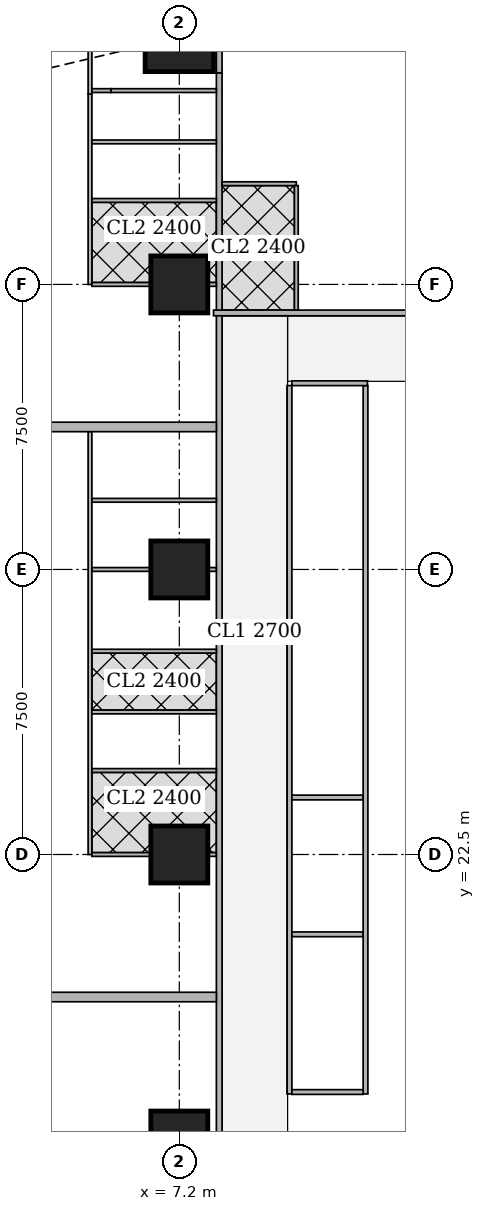
"""IFC4 building model, lengths in metres.
Left out: names, types, materials, properties, quantities, classifications, styles, units other than length and angle.
Written with IfcOpenShell. Run it as: python <this file> out.ifc"""

import sys

from ifc_helpers import new_model, si_unit, direction, frame, frame_2d, origin, origin_2d, place, context, subcontext, project, spatial, rectangle, extrude, element, fill, save


model = new_model("IFC4")
c1 = context("Model", 3, precision=1e-05, world=origin(), true_north=direction((0.0, 1.0)))
c2 = subcontext(c1, "Body", "Model", "MODEL_VIEW")
j1 = project(units=[si_unit("LENGTHUNIT", "METRE"), si_unit("PLANEANGLEUNIT", "RADIAN")], contexts=[c1])
p1 = place(None, origin())
s1 = spatial("IfcSite", under=j1, at=p1, CompositionType="ELEMENT")
p2 = place(p1, origin())
s2 = spatial("IfcBuilding", under=s1, at=p2, CompositionType="ELEMENT")
p3 = place(p2, frame((0.0, 0.0, 147.05)))
s3 = spatial("IfcBuildingStorey", under=s2, at=p3, CompositionType="ELEMENT", Elevation=147.05)
for number, where, z_axis, x_axis in (
    (1, (7.2, 15.0, 0.0), (0.0, 0.0, 1.0), (1.0, 0.0, 0.0)),
    (2, (7.2, 22.5, 0.0), (0.0, 0.0, 1.0), (1.0, 0.0, 0.0)),
    (3, (7.2, 30.0, 0.0), (0.0, 0.0, 1.0), (1.0, 0.0, 0.0)),
    (4, (7.2, 37.5, 0.0), (0.0, 0.0, 1.0), (1.0, 0.0, 0.0)),
):
    element("IfcColumn", number, at=place(p3, frame(where, z_axis=z_axis, x_axis=x_axis)), inside=s3, PredefinedType="COLUMN", context=c2, shape_type="SweptSolid", body=[
        extrude(rectangle(XDim=1.5, YDim=1.5, at=origin_2d()), origin(), (0.0, 0.0, 1.0), 3.75),
    ])
p4 = place(p3, frame((7.2, 44.0, 0.0), z_axis=(0.0, 0.0, 1.0), x_axis=(1.0, 0.0, 0.0)))
e5 = element("IfcColumn", 5, at=p4, inside=s3, PredefinedType="COLUMN", context=c2, shape_type="SweptSolid", body=[
    extrude(rectangle(XDim=1.8, YDim=1.8, at=origin_2d()), origin(), (0.0, 0.0, 1.0), 3.75),
])
p5 = place(p3, frame((8.25, 1.957, 0.0), z_axis=(0.0, 0.0, 1.0), x_axis=(0.0, 1.0, 0.0)))
e6 = element("IfcWall", 6, at=p5, inside=s3, PredefinedType="SOLIDWALL", context=c2, shape_type="SweptSolid", body=[
    extrude(rectangle(XDim=41.111, YDim=0.15, at=frame_2d((20.556, 0.0))), origin(), (0.0, 0.0, 1.0), 3.5),
])
p6 = place(p5, frame((14.418, 0.0, 0.0)))
e7 = element("IfcOpeningElement", 7, at=p6, cuts=e6, PredefinedType="OPENING", context=c2, shape_type="SweptSolid", body=[
    extrude(rectangle(XDim=1.0, YDim=2.1, at=frame_2d((0.5, 1.05))), frame((0.0, 0.085, 0.0), z_axis=(0.0, -1.0, 0.0), x_axis=(1.0, 0.0, 0.0)), (0.0, 0.0, 1.0), 0.17),
])
p7 = place(p5, frame((18.168, 0.0, 0.0)))
e8 = element("IfcOpeningElement", 8, at=p7, cuts=e6, PredefinedType="OPENING", context=c2, shape_type="SweptSolid", body=[
    extrude(rectangle(XDim=1.0, YDim=2.1, at=frame_2d((0.5, 1.05))), frame((0.0, 0.085, 0.0), z_axis=(0.0, -1.0, 0.0), x_axis=(1.0, 0.0, 0.0)), (0.0, 0.0, 1.0), 0.17),
])
p8 = place(p5, frame((33.168, 0.0, 0.0)))
e9 = element("IfcOpeningElement", 9, at=p8, cuts=e6, PredefinedType="OPENING", context=c2, shape_type="SweptSolid", body=[
    extrude(rectangle(XDim=1.0, YDim=2.1, at=frame_2d((0.5, 1.05))), frame((0.0, 0.085, 0.0), z_axis=(0.0, -1.0, 0.0), x_axis=(1.0, 0.0, 0.0)), (0.0, 0.0, 1.0), 0.17),
])
p9 = place(p3, frame((8.25, 43.068, 0.0), z_axis=(0.0, 0.0, 1.0), x_axis=(0.0, 1.0, 0.0)))
e10 = element("IfcWall", 10, at=p9, inside=s3, PredefinedType="SOLIDWALL", context=c2, shape_type="SweptSolid", body=[
    extrude(rectangle(XDim=1.805, YDim=0.15, at=frame_2d((0.902, 0.0))), origin(), (0.0, 0.0, 1.0), 2.1),
])
p10 = place(p3, frame((8.1, 36.75, 0.0), z_axis=(0.0, 0.0, 1.0), x_axis=(1.0, 0.0, 0.0)))
e11 = element("IfcWall", 11, at=p10, inside=s3, PredefinedType="SOLIDWALL", context=c2, shape_type="SweptSolid", body=[
    extrude(rectangle(XDim=5.549, YDim=0.15, at=frame_2d((2.774, 0.0))), origin(), (0.0, 0.0, 1.0), 3.5),
])
p11 = place(p10, frame((3.739, 0.0, 0.0)))
e12 = element("IfcOpeningElement", 12, at=p11, cuts=e11, PredefinedType="OPENING", context=c2, shape_type="SweptSolid", body=[
    extrude(rectangle(XDim=1.0, YDim=2.1, at=frame_2d((0.5, 1.05))), frame((0.0, 0.085, 0.0), z_axis=(0.0, -1.0, 0.0), x_axis=(1.0, 0.0, 0.0)), (0.0, 0.0, 1.0), 0.17),
])
p12 = place(p3, frame((4.85, 22.5, 0.0), z_axis=(0.0, 0.0, 1.0), x_axis=(0.0, 1.0, 0.0)))
e13 = element("IfcWall", 13, at=p12, inside=s3, PredefinedType="PARTITIONING", context=c2, shape_type="SweptSolid", body=[
    extrude(rectangle(XDim=11.125, YDim=0.1, at=frame_2d((5.562, 0.0))), origin(), (0.0, 0.0, 1.0), 3.5),
])
p13 = place(p12, frame((0.655, 0.0, 0.0)))
e14 = element("IfcOpeningElement", 14, at=p13, cuts=e13, PredefinedType="OPENING", context=c2, shape_type="SweptSolid", body=[
    extrude(rectangle(XDim=0.9, YDim=2.1, at=frame_2d((0.45, 1.05))), frame((0.0, 0.06, 0.0), z_axis=(0.0, -1.0, 0.0), x_axis=(1.0, 0.0, 0.0)), (0.0, 0.0, 1.0), 0.12),
])
p14 = place(p12, frame((4.1, 0.0, 0.0)))
e15 = element("IfcOpeningElement", 15, at=p14, cuts=e13, PredefinedType="OPENING", context=c2, shape_type="SweptSolid", body=[
    extrude(rectangle(XDim=0.9, YDim=2.1, at=frame_2d((0.45, 1.05))), frame((0.0, 0.06, 0.0), z_axis=(0.0, -1.0, 0.0), x_axis=(1.0, 0.0, 0.0)), (0.0, 0.0, 1.0), 0.12),
])
p15 = place(p12, frame((7.96, 0.0, 0.0)))
e16 = element("IfcOpeningElement", 16, at=p15, cuts=e13, PredefinedType="OPENING", context=c2, shape_type="SweptSolid", body=[
    extrude(rectangle(XDim=0.9, YDim=2.1, at=frame_2d((0.45, 1.05))), frame((0.0, 0.06, 0.0), z_axis=(0.0, -1.0, 0.0), x_axis=(1.0, 0.0, 0.0)), (0.0, 0.0, 1.0), 0.12),
])
p16 = place(p12, frame((2.53, 0.0, 0.0)))
e17 = element("IfcOpeningElement", 17, at=p16, cuts=e13, PredefinedType="OPENING", context=c2, shape_type="SweptSolid", body=[
    extrude(rectangle(XDim=0.9, YDim=2.1, at=frame_2d((0.45, 1.05))), frame((0.0, 0.06, 0.0), z_axis=(0.0, -1.0, 0.0), x_axis=(1.0, 0.0, 0.0)), (0.0, 0.0, 1.0), 0.12),
])
p17 = place(p12, frame((5.975, 0.0, 0.0)))
e18 = element("IfcOpeningElement", 18, at=p17, cuts=e13, PredefinedType="OPENING", context=c2, shape_type="SweptSolid", body=[
    extrude(rectangle(XDim=0.9, YDim=2.1, at=frame_2d((0.45, 1.05))), frame((0.0, 0.06, 0.0), z_axis=(0.0, -1.0, 0.0), x_axis=(1.0, 0.0, 0.0)), (0.0, 0.0, 1.0), 0.12),
])
p18 = place(p12, frame((9.835, 0.0, 0.0)))
e19 = element("IfcOpeningElement", 19, at=p18, cuts=e13, PredefinedType="OPENING", context=c2, shape_type="SweptSolid", body=[
    extrude(rectangle(XDim=0.9, YDim=2.1, at=frame_2d((0.45, 1.05))), frame((0.0, 0.06, 0.0), z_axis=(0.0, -1.0, 0.0), x_axis=(1.0, 0.0, 0.0)), (0.0, 0.0, 1.0), 0.12),
])
p19 = place(p3, frame((4.9, 22.5, 0.0), z_axis=(0.0, 0.0, 1.0), x_axis=(1.0, 0.0, 0.0)))
e20 = element("IfcWall", 20, at=p19, inside=s3, PredefinedType="PARTITIONING", context=c2, shape_type="SweptSolid", body=[
    extrude(rectangle(XDim=1.549, YDim=0.1, at=frame_2d((0.774, 0.0))), origin(), (0.0, 0.0, 1.0), 3.5),
])
p20 = place(p3, frame((7.951, 22.5, 0.0), z_axis=(0.0, 0.0, 1.0), x_axis=(1.0, 0.0, 0.0)))
e21 = element("IfcWall", 21, at=p20, inside=s3, PredefinedType="PARTITIONING", context=c2, shape_type="SweptSolid", body=[
    extrude(rectangle(XDim=0.224, YDim=0.1, at=frame_2d((0.112, 0.0))), origin(), (0.0, 0.0, 1.0), 3.5),
])
p21 = place(p3, frame((4.9, 26.25, 0.0), z_axis=(0.0, 0.0, 1.0), x_axis=(1.0, 0.0, 0.0)))
e22 = element("IfcWall", 22, at=p21, inside=s3, PredefinedType="PARTITIONING", context=c2, shape_type="SweptSolid", body=[
    extrude(rectangle(XDim=3.275, YDim=0.1, at=frame_2d((1.638, 0.0))), origin(), (0.0, 0.0, 1.0), 3.5),
])
p22 = place(p3, frame((4.9, 30.0, 0.0), z_axis=(0.0, 0.0, 1.0), x_axis=(1.0, 0.0, 0.0)))
e23 = element("IfcWall", 23, at=p22, inside=s3, PredefinedType="PARTITIONING", context=c2, shape_type="SweptSolid", body=[
    extrude(rectangle(XDim=1.549, YDim=0.1, at=frame_2d((0.774, 0.0))), origin(), (0.0, 0.0, 1.0), 3.5),
])
p23 = place(p3, frame((7.951, 30.0, 0.0), z_axis=(0.0, 0.0, 1.0), x_axis=(1.0, 0.0, 0.0)))
e24 = element("IfcWall", 24, at=p23, inside=s3, PredefinedType="PARTITIONING", context=c2, shape_type="SweptSolid", body=[
    extrude(rectangle(XDim=0.224, YDim=0.1, at=frame_2d((0.112, 0.0))), origin(), (0.0, 0.0, 1.0), 3.5),
])
for number, where, z_axis, x_axis in (
    (25, (4.9, 24.71, 0.0), (0.0, 0.0, 1.0), (1.0, 0.0, 0.0)),
    (26, (4.9, 27.85, 0.0), (0.0, 0.0, 1.0), (1.0, 0.0, 0.0)),
    (27, (4.9, 31.82, 0.0), (0.0, 0.0, 1.0), (1.0, 0.0, 0.0)),
):
    element("IfcWall", number, at=place(p3, frame(where, z_axis=z_axis, x_axis=x_axis)), inside=s3, PredefinedType="PARTITIONING", context=c2, shape_type="SweptSolid", body=[
        extrude(rectangle(XDim=3.275, YDim=0.1, at=frame_2d((1.638, 0.0))), origin(), (0.0, 0.0, 1.0), 3.5),
    ])
p24 = place(p3, frame((3.65, 18.75, 0.0), z_axis=(0.0, 0.0, 1.0), x_axis=(1.0, 0.0, 0.0)))
e28 = element("IfcWall", 28, at=p24, inside=s3, PredefinedType="SOLIDWALL", context=c2, shape_type="SweptSolid", body=[
    extrude(rectangle(XDim=4.525, YDim=0.25, at=frame_2d((2.263, 0.0))), origin(), (0.0, 0.0, 1.0), 3.5),
])
p25 = place(p3, frame((4.85, 37.5, 0.0), z_axis=(0.0, 0.0, 1.0), x_axis=(0.0, 1.0, 0.0)))
e29 = element("IfcWall", 29, at=p25, inside=s3, PredefinedType="PARTITIONING", context=c2, shape_type="SweptSolid", body=[
    extrude(rectangle(XDim=5.007, YDim=0.1, at=frame_2d((2.503, 0.0))), origin(), (0.0, 0.0, 1.0), 3.5),
])
p26 = place(p25, frame((0.655, 0.0, 0.0)))
e30 = element("IfcOpeningElement", 30, at=p26, cuts=e29, PredefinedType="OPENING", context=c2, shape_type="SweptSolid", body=[
    extrude(rectangle(XDim=0.9, YDim=2.1, at=frame_2d((0.45, 1.05))), frame((0.0, 0.06, 0.0), z_axis=(0.0, -1.0, 0.0), x_axis=(1.0, 0.0, 0.0)), (0.0, 0.0, 1.0), 0.12),
])
p27 = place(p25, frame((2.53, 0.0, 0.0)))
e31 = element("IfcOpeningElement", 31, at=p27, cuts=e29, PredefinedType="OPENING", context=c2, shape_type="SweptSolid", body=[
    extrude(rectangle(XDim=0.9, YDim=2.1, at=frame_2d((0.45, 1.05))), frame((0.0, 0.06, 0.0), z_axis=(0.0, -1.0, 0.0), x_axis=(1.0, 0.0, 0.0)), (0.0, 0.0, 1.0), 0.12),
])
p28 = place(p3, frame((4.85, 42.507, 0.0), z_axis=(0.0, 0.0, 1.0), x_axis=(0.0, 1.0, 0.0)))
e32 = element("IfcWall", 32, at=p28, inside=s3, PredefinedType="PARTITIONING", context=c2, shape_type="SweptSolid", body=[
    extrude(rectangle(XDim=1.874, YDim=0.1, at=frame_2d((0.937, 0.0))), origin(), (0.0, 0.0, 1.0), 2.1),
])
p29 = place(p3, frame((4.9, 37.5, 0.0), z_axis=(0.0, 0.0, 1.0), x_axis=(1.0, 0.0, 0.0)))
e33 = element("IfcWall", 33, at=p29, inside=s3, PredefinedType="PARTITIONING", context=c2, shape_type="SweptSolid", body=[
    extrude(rectangle(XDim=1.549, YDim=0.1, at=frame_2d((0.774, 0.0))), origin(), (0.0, 0.0, 1.0), 3.5),
])
p30 = place(p3, frame((7.951, 37.5, 0.0), z_axis=(0.0, 0.0, 1.0), x_axis=(1.0, 0.0, 0.0)))
e34 = element("IfcWall", 34, at=p30, inside=s3, PredefinedType="PARTITIONING", context=c2, shape_type="SweptSolid", body=[
    extrude(rectangle(XDim=0.224, YDim=0.1, at=frame_2d((0.112, 0.0))), origin(), (0.0, 0.0, 1.0), 3.5),
])
for number, where, z_axis, x_axis in (
    (35, (4.9, 41.25, 0.0), (0.0, 0.0, 1.0), (1.0, 0.0, 0.0)),
    (36, (4.9, 39.71, 0.0), (0.0, 0.0, 1.0), (1.0, 0.0, 0.0)),
):
    element("IfcWall", number, at=place(p3, frame(where, z_axis=z_axis, x_axis=x_axis)), inside=s3, PredefinedType="PARTITIONING", context=c2, shape_type="SweptSolid", body=[
        extrude(rectangle(XDim=3.275, YDim=0.1, at=frame_2d((1.638, 0.0))), origin(), (0.0, 0.0, 1.0), 3.5),
    ])
p31 = place(p3, frame((3.65, 33.75, 0.0), z_axis=(0.0, 0.0, 1.0), x_axis=(1.0, 0.0, 0.0)))
e37 = element("IfcWall", 37, at=p31, inside=s3, PredefinedType="SOLIDWALL", context=c2, shape_type="SweptSolid", body=[
    extrude(rectangle(XDim=4.525, YDim=0.25, at=frame_2d((2.263, 0.0))), origin(), (0.0, 0.0, 1.0), 3.5),
])
p32 = place(p3, frame((8.325, 40.15, 0.0), z_axis=(0.0, 0.0, 1.0), x_axis=(1.0, 0.0, 0.0)))
e38 = element("IfcWall", 38, at=p32, inside=s3, PredefinedType="PARTITIONING", context=c2, shape_type="SweptSolid", body=[
    extrude(rectangle(XDim=1.954, YDim=0.1, at=frame_2d((0.977, 0.0))), origin(), (0.0, 0.0, 1.0), 3.5),
])
p33 = place(p32, frame((0.475, 0.0, 0.0)))
e39 = element("IfcOpeningElement", 39, at=p33, cuts=e38, PredefinedType="OPENING", context=c2, shape_type="SweptSolid", body=[
    extrude(rectangle(XDim=0.9, YDim=2.1, at=frame_2d((0.45, 1.05))), frame((0.0, 0.06, 0.0), z_axis=(0.0, -1.0, 0.0), x_axis=(1.0, 0.0, 0.0)), (0.0, 0.0, 1.0), 0.12),
])
p34 = place(p3, frame((10.279, 36.825, 0.0), z_axis=(0.0, 0.0, 1.0), x_axis=(0.0, 1.0, 0.0)))
e40 = element("IfcWall", 40, at=p34, inside=s3, PredefinedType="PARTITIONING", context=c2, shape_type="SweptSolid", body=[
    extrude(rectangle(XDim=3.275, YDim=0.1, at=frame_2d((1.638, 0.0))), origin(), (0.0, 0.0, 1.0), 3.5),
])
p35 = place(p3, frame((4.9, 42.6, 0.0), z_axis=(0.0, 0.0, 1.0), x_axis=(1.0, 0.0, 0.0)))
e41 = element("IfcWall", 41, at=p35, inside=s3, PredefinedType="PARTITIONING", context=c2, shape_type="SweptSolid", body=[
    extrude(rectangle(XDim=0.503, YDim=0.1, at=frame_2d((0.251, 0.0))), origin(), (0.0, 0.0, 1.0), 2.1),
])
p36 = place(p3, frame((5.403, 42.6, 0.0), z_axis=(0.0, 0.0, 1.0), x_axis=(1.0, 0.0, 0.0)))
e42 = element("IfcWall", 42, at=p36, inside=s3, PredefinedType="PARTITIONING", context=c2, shape_type="SweptSolid", body=[
    extrude(rectangle(XDim=2.772, YDim=0.1, at=frame_2d((1.386, 0.0))), origin(), (0.0, 0.0, 1.0), 3.5),
])
p37 = place(p36, frame((0.15, 0.0, 0.0)))
e43 = element("IfcOpeningElement", 43, at=p37, cuts=e42, PredefinedType="OPENING", context=c2, shape_type="SweptSolid", body=[
    extrude(rectangle(XDim=0.9, YDim=2.1, at=frame_2d((0.45, 1.05))), frame((0.0, 0.06, 0.0), z_axis=(0.0, -1.0, 0.0), x_axis=(1.0, 0.0, 0.0)), (0.0, 0.0, 1.0), 0.12),
])
p38 = place(p3, frame((10.1, 16.2, 0.0), z_axis=(0.0, 0.0, 1.0), x_axis=(0.0, 1.0, 0.0)))
e44 = element("IfcWall", 44, at=p38, inside=s3, PredefinedType="PARTITIONING", context=c2, shape_type="SweptSolid", body=[
    extrude(rectangle(XDim=18.638, YDim=0.125, at=frame_2d((9.319, 0.0))), origin(), (0.0, 0.0, 1.0), 3.5),
])
p39 = place(p38, frame((1.6, 0.0, 0.0)))
e45 = element("IfcOpeningElement", 45, at=p39, cuts=e44, PredefinedType="OPENING", context=c2, shape_type="SweptSolid", body=[
    extrude(rectangle(XDim=1.0, YDim=2.1, at=frame_2d((0.5, 1.05))), frame((0.0, 0.073, 0.0), z_axis=(0.0, -1.0, 0.0), x_axis=(1.0, 0.0, 0.0)), (0.0, 0.0, 1.0), 0.145),
])
p40 = place(p38, frame((5.5, 0.0, 0.0)))
e46 = element("IfcOpeningElement", 46, at=p40, cuts=e44, PredefinedType="OPENING", context=c2, shape_type="SweptSolid", body=[
    extrude(rectangle(XDim=1.0, YDim=2.1, at=frame_2d((0.5, 1.05))), frame((0.0, 0.073, 0.0), z_axis=(0.0, -1.0, 0.0), x_axis=(1.0, 0.0, 0.0)), (0.0, 0.0, 1.0), 0.145),
])
p41 = place(p38, frame((12.775, 0.0, 0.0)))
e47 = element("IfcOpeningElement", 47, at=p41, cuts=e44, PredefinedType="OPENING", context=c2, shape_type="SweptSolid", body=[
    extrude(rectangle(XDim=1.0, YDim=2.1, at=frame_2d((0.5, 1.05))), frame((0.0, 0.073, 0.0), z_axis=(0.0, -1.0, 0.0), x_axis=(1.0, 0.0, 0.0)), (0.0, 0.0, 1.0), 0.145),
])
for number, where, z_axis, x_axis in (
    (48, (10.162, 20.4, 0.0), (0.0, 0.0, 1.0), (1.0, 0.0, 0.0)),
    (49, (10.162, 24.0, 0.0), (0.0, 0.0, 1.0), (1.0, 0.0, 0.0)),
):
    element("IfcWall", number, at=place(p3, frame(where, z_axis=z_axis, x_axis=x_axis)), inside=s3, PredefinedType="PARTITIONING", context=c2, shape_type="SweptSolid", body=[
        extrude(rectangle(XDim=1.875, YDim=0.125, at=frame_2d((0.938, 0.0))), origin(), (0.0, 0.0, 1.0), 3.5),
    ])
p42 = place(p3, frame((12.1, 16.2, 0.0), z_axis=(0.0, 0.0, 1.0), x_axis=(0.0, 1.0, 0.0)))
e50 = element("IfcWall", 50, at=p42, inside=s3, PredefinedType="PARTITIONING", context=c2, shape_type="SweptSolid", body=[
    extrude(rectangle(XDim=18.637, YDim=0.125, at=frame_2d((9.318, 0.0))), origin(), (0.0, 0.0, 1.0), 3.5),
])
p43 = place(p3, frame((10.162, 16.25, 0.0), z_axis=(0.0, 0.0, 1.0), x_axis=(1.0, 0.0, 0.0)))
e51 = element("IfcWall", 51, at=p43, inside=s3, PredefinedType="PARTITIONING", context=c2, shape_type="SweptSolid", body=[
    extrude(rectangle(XDim=1.875, YDim=0.125, at=frame_2d((0.938, 0.0))), origin(), (0.0, 0.0, 1.0), 3.5),
])
p44 = place(p3, frame((10.162, 34.9, 0.0), z_axis=(0.0, 0.0, 1.0), x_axis=(1.0, 0.0, 0.0)))
e52 = element("IfcWall", 52, at=p44, inside=s3, PredefinedType="PARTITIONING", context=c2, shape_type="SweptSolid", body=[
    extrude(rectangle(XDim=1.988, YDim=0.125, at=frame_2d((0.994, 0.0))), origin(), (0.0, 0.0, 1.0), 3.5),
])
p45 = place(p6, origin())
e53 = element("IfcDoor", 53, at=p45, inside=s3, OperationType="SINGLE_SWING_RIGHT", PredefinedType="DOOR", context=c2, shape_type="SweptSolid", body=[
    extrude(rectangle(XDim=1.0, YDim=2.1, at=frame_2d((0.5, 1.05))), frame((0.0, 0.025, 0.0), z_axis=(0.0, -1.0, 0.0), x_axis=(1.0, 0.0, 0.0)), (0.0, 0.0, 1.0), 0.05),
])
fill(e7, e53)
p46 = place(p13, origin())
e54 = element("IfcDoor", 54, at=p46, inside=s3, OperationType="SINGLE_SWING_RIGHT", PredefinedType="DOOR", context=c2, shape_type="SweptSolid", body=[
    extrude(rectangle(XDim=0.9, YDim=2.1, at=frame_2d((0.45, 1.05))), frame((0.0, 0.025, 0.0), z_axis=(0.0, -1.0, 0.0), x_axis=(1.0, 0.0, 0.0)), (0.0, 0.0, 1.0), 0.05),
])
fill(e14, e54)
p47 = place(p14, origin())
e55 = element("IfcDoor", 55, at=p47, inside=s3, OperationType="SINGLE_SWING_RIGHT", PredefinedType="DOOR", context=c2, shape_type="SweptSolid", body=[
    extrude(rectangle(XDim=0.9, YDim=2.1, at=frame_2d((0.45, 1.05))), frame((0.0, 0.025, 0.0), z_axis=(0.0, -1.0, 0.0), x_axis=(1.0, 0.0, 0.0)), (0.0, 0.0, 1.0), 0.05),
])
fill(e15, e55)
p48 = place(p15, origin())
e56 = element("IfcDoor", 56, at=p48, inside=s3, OperationType="SINGLE_SWING_RIGHT", PredefinedType="DOOR", context=c2, shape_type="SweptSolid", body=[
    extrude(rectangle(XDim=0.9, YDim=2.1, at=frame_2d((0.45, 1.05))), frame((0.0, 0.025, 0.0), z_axis=(0.0, -1.0, 0.0), x_axis=(1.0, 0.0, 0.0)), (0.0, 0.0, 1.0), 0.05),
])
fill(e16, e56)
p49 = place(p16, origin())
e57 = element("IfcDoor", 57, at=p49, inside=s3, OperationType="SINGLE_SWING_LEFT", PredefinedType="DOOR", context=c2, shape_type="SweptSolid", body=[
    extrude(rectangle(XDim=0.9, YDim=2.1, at=frame_2d((0.45, 1.05))), frame((0.0, 0.025, 0.0), z_axis=(0.0, -1.0, 0.0), x_axis=(1.0, 0.0, 0.0)), (0.0, 0.0, 1.0), 0.05),
])
fill(e17, e57)
p50 = place(p17, origin())
e58 = element("IfcDoor", 58, at=p50, inside=s3, OperationType="SINGLE_SWING_LEFT", PredefinedType="DOOR", context=c2, shape_type="SweptSolid", body=[
    extrude(rectangle(XDim=0.9, YDim=2.1, at=frame_2d((0.45, 1.05))), frame((0.0, 0.025, 0.0), z_axis=(0.0, -1.0, 0.0), x_axis=(1.0, 0.0, 0.0)), (0.0, 0.0, 1.0), 0.05),
])
fill(e18, e58)
p51 = place(p18, origin())
e59 = element("IfcDoor", 59, at=p51, inside=s3, OperationType="SINGLE_SWING_LEFT", PredefinedType="DOOR", context=c2, shape_type="SweptSolid", body=[
    extrude(rectangle(XDim=0.9, YDim=2.1, at=frame_2d((0.45, 1.05))), frame((0.0, 0.025, 0.0), z_axis=(0.0, -1.0, 0.0), x_axis=(1.0, 0.0, 0.0)), (0.0, 0.0, 1.0), 0.05),
])
fill(e19, e59)
p52 = place(p7, origin())
e60 = element("IfcDoor", 60, at=p52, inside=s3, OperationType="SINGLE_SWING_LEFT", PredefinedType="DOOR", context=c2, shape_type="SweptSolid", body=[
    extrude(rectangle(XDim=1.0, YDim=2.1, at=frame_2d((0.5, 1.05))), frame((0.0, 0.025, 0.0), z_axis=(0.0, -1.0, 0.0), x_axis=(1.0, 0.0, 0.0)), (0.0, 0.0, 1.0), 0.05),
])
fill(e8, e60)
p53 = place(p26, origin())
e61 = element("IfcDoor", 61, at=p53, inside=s3, OperationType="SINGLE_SWING_RIGHT", PredefinedType="DOOR", context=c2, shape_type="SweptSolid", body=[
    extrude(rectangle(XDim=0.9, YDim=2.1, at=frame_2d((0.45, 1.05))), frame((0.0, 0.025, 0.0), z_axis=(0.0, -1.0, 0.0), x_axis=(1.0, 0.0, 0.0)), (0.0, 0.0, 1.0), 0.05),
])
fill(e30, e61)
p54 = place(p27, origin())
e62 = element("IfcDoor", 62, at=p54, inside=s3, OperationType="SINGLE_SWING_LEFT", PredefinedType="DOOR", context=c2, shape_type="SweptSolid", body=[
    extrude(rectangle(XDim=0.9, YDim=2.1, at=frame_2d((0.45, 1.05))), frame((0.0, 0.025, 0.0), z_axis=(0.0, -1.0, 0.0), x_axis=(1.0, 0.0, 0.0)), (0.0, 0.0, 1.0), 0.05),
])
fill(e31, e62)
p55 = place(p8, origin())
e63 = element("IfcDoor", 63, at=p55, inside=s3, OperationType="SINGLE_SWING_RIGHT", PredefinedType="DOOR", context=c2, shape_type="SweptSolid", body=[
    extrude(rectangle(XDim=1.0, YDim=2.1, at=frame_2d((0.5, 1.05))), frame((0.0, 0.025, 0.0), z_axis=(0.0, -1.0, 0.0), x_axis=(1.0, 0.0, 0.0)), (0.0, 0.0, 1.0), 0.05),
])
fill(e9, e63)
p56 = place(p33, origin())
e64 = element("IfcDoor", 64, at=p56, inside=s3, OperationType="SINGLE_SWING_RIGHT", PredefinedType="DOOR", context=c2, shape_type="SweptSolid", body=[
    extrude(rectangle(XDim=0.9, YDim=2.1, at=frame_2d((0.45, 1.05))), frame((0.0, 0.025, 0.0), z_axis=(0.0, -1.0, 0.0), x_axis=(1.0, 0.0, 0.0)), (0.0, 0.0, 1.0), 0.05),
])
fill(e39, e64)
p57 = place(p11, origin())
e65 = element("IfcDoor", 65, at=p57, inside=s3, OperationType="SINGLE_SWING_RIGHT", PredefinedType="DOOR", context=c2, shape_type="SweptSolid", body=[
    extrude(rectangle(XDim=1.0, YDim=2.1, at=frame_2d((0.5, 1.05))), frame((0.0, 0.025, 0.0), z_axis=(0.0, -1.0, 0.0), x_axis=(1.0, 0.0, 0.0)), (0.0, 0.0, 1.0), 0.05),
])
fill(e12, e65)
p58 = place(p37, origin())
e66 = element("IfcDoor", 66, at=p58, inside=s3, OperationType="SINGLE_SWING_LEFT", PredefinedType="DOOR", context=c2, shape_type="SweptSolid", body=[
    extrude(rectangle(XDim=0.9, YDim=2.1, at=frame_2d((0.45, 1.05))), frame((0.0, 0.025, 0.0), z_axis=(0.0, -1.0, 0.0), x_axis=(1.0, 0.0, 0.0)), (0.0, 0.0, 1.0), 0.05),
])
fill(e43, e66)
p59 = place(p39, origin())
e67 = element("IfcDoor", 67, at=p59, inside=s3, OperationType="SINGLE_SWING_RIGHT", PredefinedType="DOOR", context=c2, shape_type="SweptSolid", body=[
    extrude(rectangle(XDim=1.0, YDim=2.1, at=frame_2d((0.5, 1.05))), frame((0.0, 0.025, 0.0), z_axis=(0.0, -1.0, 0.0), x_axis=(1.0, 0.0, 0.0)), (0.0, 0.0, 1.0), 0.05),
])
fill(e45, e67)
p60 = place(p40, origin())
e68 = element("IfcDoor", 68, at=p60, inside=s3, OperationType="SINGLE_SWING_RIGHT", PredefinedType="DOOR", context=c2, shape_type="SweptSolid", body=[
    extrude(rectangle(XDim=1.0, YDim=2.1, at=frame_2d((0.5, 1.05))), frame((0.0, 0.025, 0.0), z_axis=(0.0, -1.0, 0.0), x_axis=(1.0, 0.0, 0.0)), (0.0, 0.0, 1.0), 0.05),
])
fill(e46, e68)
p61 = place(p41, origin())
e69 = element("IfcDoor", 69, at=p61, inside=s3, OperationType="SINGLE_SWING_LEFT", PredefinedType="DOOR", context=c2, shape_type="SweptSolid", body=[
    extrude(rectangle(XDim=1.0, YDim=2.1, at=frame_2d((0.5, 1.05))), frame((0.0, 0.025, 0.0), z_axis=(0.0, -1.0, 0.0), x_axis=(1.0, 0.0, 0.0)), (0.0, 0.0, 1.0), 0.05),
])
fill(e47, e69)
save(model, sys.argv[1])
